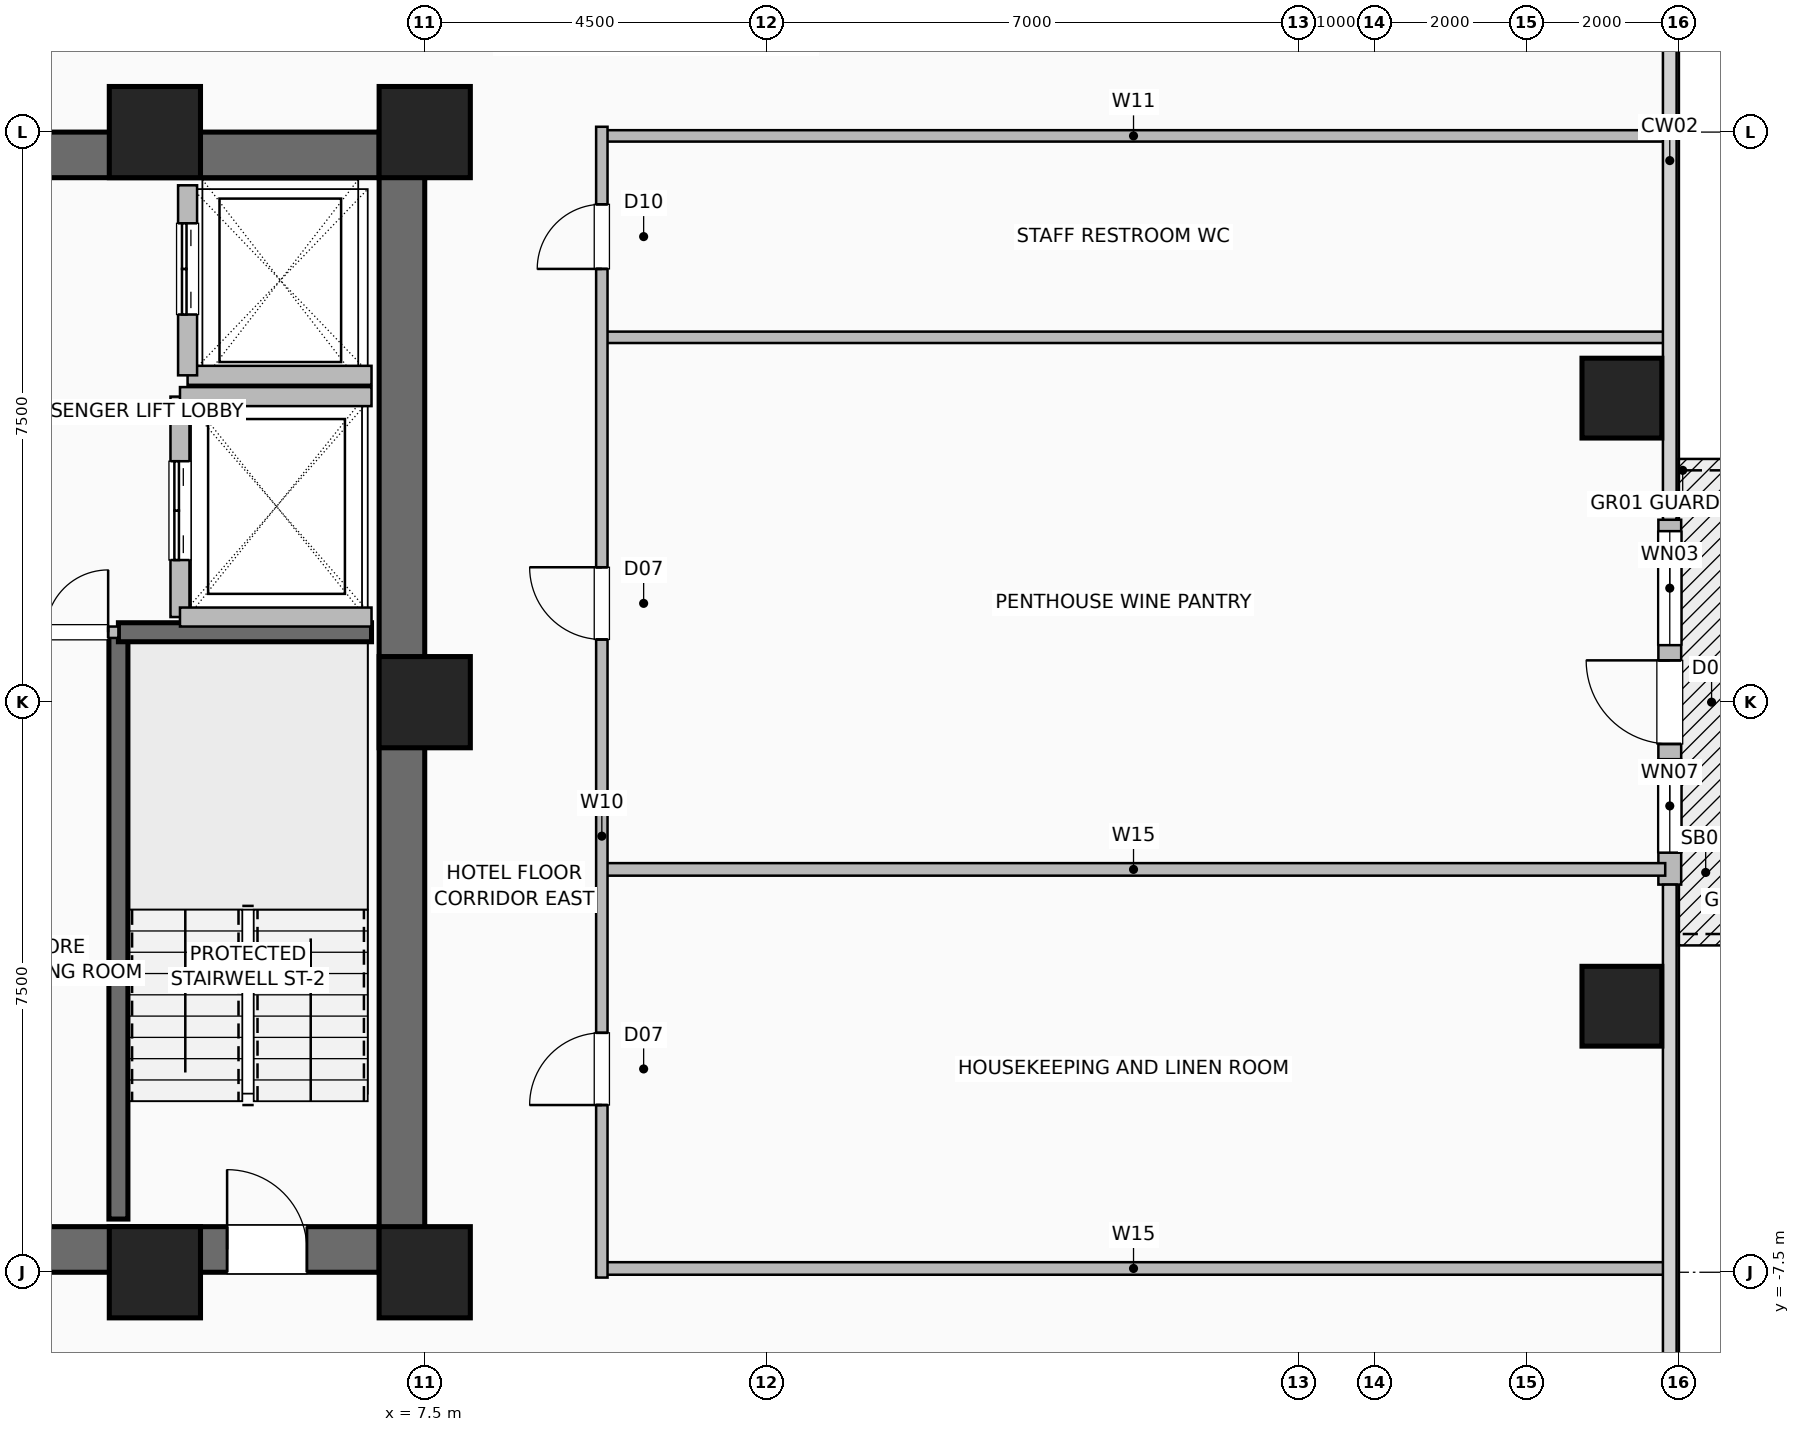
"""IFC4 building model, lengths in metres.
Left out: names, types, materials, properties, quantities, classifications, styles, units other than length and angle.
Written with IfcOpenShell. Run it as: python <this file> out.ifc"""

import sys

from ifc_helpers import new_model, si_unit, direction, frame, frame_2d, origin, origin_2d, place, context, subcontext, project, spatial, rectangle, hollow_rectangle, extrude, element, fill, save


model = new_model("IFC4")
c1 = context("Model", 3, precision=1e-05, world=origin(), true_north=direction((0.0, 1.0)))
c2 = subcontext(c1, "Body", "Model", "MODEL_VIEW")
j1 = project(units=[si_unit("LENGTHUNIT", "METRE"), si_unit("PLANEANGLEUNIT", "RADIAN")], contexts=[c1])
p1 = place(None, origin())
s1 = spatial("IfcSite", under=j1, at=p1, CompositionType="ELEMENT")
p2 = place(p1, origin())
s2 = spatial("IfcBuilding", under=s1, at=p2, CompositionType="ELEMENT")
p3 = place(p2, frame((0.0, 0.0, 76.0)))
s3 = spatial("IfcBuildingStorey", under=s2, at=p3, CompositionType="ELEMENT", Elevation=76.0)
for number, where, z_axis, x_axis in (
    (1, (3.95, -7.5, 0.0), (0.0, 0.0, 1.0), (1.0, 0.0, 0.0)),
    (2, (7.5, -7.5, 0.0), (0.0, 0.0, 1.0), (1.0, 0.0, 0.0)),
    (3, (7.5, 0.0, 0.0), (0.0, 0.0, 1.0), (1.0, 0.0, 0.0)),
    (4, (7.5, 7.5, 0.0), (0.0, 0.0, 1.0), (1.0, 0.0, 0.0)),
    (5, (3.95, 7.5, 0.0), (0.0, 0.0, 1.0), (1.0, 0.0, 0.0)),
):
    element("IfcColumn", number, at=place(p3, frame(where, z_axis=z_axis, x_axis=x_axis)), inside=s3, PredefinedType="COLUMN", context=c2, shape_type="SweptSolid", body=[
        extrude(hollow_rectangle(XDim=1.2, YDim=1.2, WallThickness=0.055, at=origin_2d()), origin(), (0.0, 0.0, 1.0), 3.5),
    ])
for number, where, z_axis, x_axis in (
    (6, (23.25, -4.0, 0.0), (0.0, 0.0, 1.0), (1.0, 0.0, 0.0)),
    (7, (23.25, 4.0, 0.0), (0.0, 0.0, 1.0), (1.0, 0.0, 0.0)),
):
    element("IfcColumn", number, at=place(p3, frame(where, z_axis=z_axis, x_axis=x_axis)), inside=s3, PredefinedType="COLUMN", context=c2, shape_type="SweptSolid", body=[
        extrude(hollow_rectangle(XDim=1.05, YDim=1.05, WallThickness=0.05, at=origin_2d()), origin(), (0.0, 0.0, 1.0), 3.5),
    ])
p4 = place(p3, frame((23.88, -2.4, 0.0), z_axis=(0.0, 0.0, 1.0), x_axis=(0.0, 1.0, 0.0)))
e8 = element("IfcWall", 8, at=p4, inside=s3, PredefinedType="SOLIDWALL", context=c2, shape_type="SweptSolid", body=[
    extrude(rectangle(XDim=4.8, YDim=0.3, at=frame_2d((2.4, 0.0))), origin(), (0.0, 0.0, 1.0), 3.25),
])
p5 = place(p4, frame((1.85, 0.0, 0.0)))
e9 = element("IfcOpeningElement", 9, at=p5, cuts=e8, PredefinedType="OPENING", context=c2, shape_type="SweptSolid", body=[
    extrude(rectangle(XDim=1.1, YDim=2.2, at=frame_2d((0.55, 1.1))), frame((0.0, 0.16, 0.0), z_axis=(0.0, -1.0, 0.0), x_axis=(1.0, 0.0, 0.0)), (0.0, 0.0, 1.0), 0.32),
])
p6 = place(p4, frame((0.42, 0.0, 0.85)))
e10 = element("IfcOpeningElement", 10, at=p6, cuts=e8, PredefinedType="OPENING", context=c2, shape_type="SweptSolid", body=[
    extrude(rectangle(XDim=1.23, YDim=1.8, at=frame_2d((0.615, 0.9))), frame((0.0, 0.16, 0.0), z_axis=(0.0, -1.0, 0.0), x_axis=(1.0, 0.0, 0.0)), (0.0, 0.0, 1.0), 0.32),
])
p7 = place(p4, frame((3.15, 0.0, 0.85)))
e11 = element("IfcOpeningElement", 11, at=p7, cuts=e8, PredefinedType="OPENING", context=c2, shape_type="SweptSolid", body=[
    extrude(rectangle(XDim=1.5, YDim=1.8, at=frame_2d((0.75, 0.9))), frame((0.0, 0.16, 0.0), z_axis=(0.0, -1.0, 0.0), x_axis=(1.0, 0.0, 0.0)), (0.0, 0.0, 1.0), 0.32),
])
p8 = place(p3, frame((-7.5, -7.2, 0.0), z_axis=(0.0, 0.0, 1.0), x_axis=(1.0, 0.0, 0.0)))
e12 = element("IfcWall", 12, at=p8, inside=s3, PredefinedType="SHEAR", context=c2, shape_type="SweptSolid", body=[
    extrude(rectangle(XDim=15.0, YDim=0.6, at=frame_2d((7.5, 0.0))), origin(), (0.0, 0.0, 1.0), 3.25),
])
p9 = place(p8, frame((1.55, 0.0, 0.0)))
e13 = element("IfcOpeningElement", 13, at=p9, cuts=e12, PredefinedType="OPENING", context=c2, shape_type="SweptSolid", body=[
    extrude(rectangle(XDim=1.05, YDim=2.08, at=frame_2d((0.525, 1.04))), frame((0.0, 0.31, 0.0), z_axis=(0.0, -1.0, 0.0), x_axis=(1.0, 0.0, 0.0)), (0.0, 0.0, 1.0), 0.62),
])
p10 = place(p8, frame((12.4, 0.0, 0.0)))
e14 = element("IfcOpeningElement", 14, at=p10, cuts=e12, PredefinedType="OPENING", context=c2, shape_type="SweptSolid", body=[
    extrude(rectangle(XDim=1.05, YDim=2.08, at=frame_2d((0.525, 1.04))), frame((0.0, 0.31, 0.0), z_axis=(0.0, -1.0, 0.0), x_axis=(1.0, 0.0, 0.0)), (0.0, 0.0, 1.0), 0.62),
])
p11 = place(p8, frame((4.64, 0.0, 0.0)))
e15 = element("IfcOpeningElement", 15, at=p11, cuts=e12, PredefinedType="OPENING", context=c2, shape_type="SweptSolid", body=[
    extrude(rectangle(XDim=1.1, YDim=2.2, at=frame_2d((0.55, 1.1))), frame((0.0, 0.31, 0.0), z_axis=(0.0, -1.0, 0.0), x_axis=(1.0, 0.0, 0.0)), (0.0, 0.0, 1.0), 0.62),
])
p12 = place(p8, frame((6.52, 0.0, 0.0)))
e16 = element("IfcOpeningElement", 16, at=p12, cuts=e12, PredefinedType="OPENING", context=c2, shape_type="SweptSolid", body=[
    extrude(rectangle(XDim=1.1, YDim=2.2, at=frame_2d((0.55, 1.1))), frame((0.0, 0.31, 0.0), z_axis=(0.0, -1.0, 0.0), x_axis=(1.0, 0.0, 0.0)), (0.0, 0.0, 1.0), 0.62),
])
p13 = place(p8, frame((8.4, 0.0, 0.0)))
e17 = element("IfcOpeningElement", 17, at=p13, cuts=e12, PredefinedType="OPENING", context=c2, shape_type="SweptSolid", body=[
    extrude(rectangle(XDim=1.1, YDim=2.2, at=frame_2d((0.55, 1.1))), frame((0.0, 0.31, 0.0), z_axis=(0.0, -1.0, 0.0), x_axis=(1.0, 0.0, 0.0)), (0.0, 0.0, 1.0), 0.62),
])
for number, where, z_axis, x_axis in (
    (18, (-7.5, 7.2, 0.0), (0.0, 0.0, 1.0), (1.0, 0.0, 0.0)),
    (19, (7.2, -7.5, 0.0), (0.0, 0.0, 1.0), (0.0, 1.0, 0.0)),
):
    element("IfcWall", number, at=place(p3, frame(where, z_axis=z_axis, x_axis=x_axis)), inside=s3, PredefinedType="SHEAR", context=c2, shape_type="SweptSolid", body=[
        extrude(rectangle(XDim=15.0, YDim=0.6, at=frame_2d((7.5, 0.0))), origin(), (0.0, 0.0, 1.0), 3.25),
    ])
p14 = place(p3, frame((3.47, -6.8, 0.0), z_axis=(0.0, 0.0, 1.0), x_axis=(0.0, 1.0, 0.0)))
e20 = element("IfcWall", 20, at=p14, inside=s3, PredefinedType="SHEAR", context=c2, shape_type="SweptSolid", body=[
    extrude(rectangle(XDim=7.72, YDim=0.25, at=frame_2d((3.86, 0.0))), origin(), (0.0, 0.0, 1.0), 3.25),
])
p15 = place(p3, frame((3.47, 0.92, 0.0), z_axis=(0.0, 0.0, 1.0), x_axis=(1.0, 0.0, 0.0)))
e21 = element("IfcWall", 21, at=p15, inside=s3, PredefinedType="SHEAR", context=c2, shape_type="SweptSolid", body=[
    extrude(rectangle(XDim=3.33, YDim=0.25, at=frame_2d((1.665, 0.0))), origin(), (0.0, 0.0, 1.0), 3.25),
])
p16 = place(p3, frame((4.38, 4.3, 0.0), z_axis=(0.0, 0.0, 1.0), x_axis=(1.0, 0.0, 0.0)))
e22 = element("IfcWall", 22, at=p16, inside=s3, PredefinedType="SHEAR", context=c2, shape_type="SweptSolid", body=[
    extrude(rectangle(XDim=2.42, YDim=0.25, at=frame_2d((1.21, 0.0))), origin(), (0.0, 0.0, 1.0), 3.25),
])
p17 = place(p3, frame((4.38, 4.3, 0.0), z_axis=(0.0, 0.0, 1.0), x_axis=(0.0, 1.0, 0.0)))
e23 = element("IfcWall", 23, at=p17, inside=s3, PredefinedType="SHEAR", context=c2, shape_type="SweptSolid", body=[
    extrude(rectangle(XDim=2.5, YDim=0.25, at=frame_2d((1.25, 0.0))), origin(), (0.0, 0.0, 1.0), 3.25),
])
p18 = place(p17, frame((0.8, 0.0, 0.0)))
e24 = element("IfcOpeningElement", 24, at=p18, cuts=e23, PredefinedType="OPENING", context=c2, shape_type="SweptSolid", body=[
    extrude(rectangle(XDim=1.2, YDim=2.2, at=frame_2d((0.6, 1.1))), frame((0.0, 0.135, 0.0), z_axis=(0.0, -1.0, 0.0), x_axis=(1.0, 0.0, 0.0)), (0.0, 0.0, 1.0), 0.27),
])
p19 = place(p3, frame((4.28, 1.12, 0.0), z_axis=(0.0, 0.0, 1.0), x_axis=(0.0, 1.0, 0.0)))
e25 = element("IfcWall", 25, at=p19, inside=s3, PredefinedType="SHEAR", context=c2, shape_type="SweptSolid", body=[
    extrude(rectangle(XDim=2.9, YDim=0.25, at=frame_2d((1.45, 0.0))), origin(), (0.0, 0.0, 1.0), 3.25),
])
p20 = place(p19, frame((0.75, 0.0, 0.0)))
e26 = element("IfcOpeningElement", 26, at=p20, cuts=e25, PredefinedType="OPENING", context=c2, shape_type="SweptSolid", body=[
    extrude(rectangle(XDim=1.3, YDim=2.3, at=frame_2d((0.65, 1.15))), frame((0.0, 0.135, 0.0), z_axis=(0.0, -1.0, 0.0), x_axis=(1.0, 0.0, 0.0)), (0.0, 0.0, 1.0), 0.27),
])
for number, where, z_axis, x_axis in (
    (27, (4.28, 1.12, 0.0), (0.0, 0.0, 1.0), (1.0, 0.0, 0.0)),
    (28, (4.28, 4.02, 0.0), (0.0, 0.0, 1.0), (1.0, 0.0, 0.0)),
):
    element("IfcWall", number, at=place(p3, frame(where, z_axis=z_axis, x_axis=x_axis)), inside=s3, PredefinedType="SHEAR", context=c2, shape_type="SweptSolid", body=[
        extrude(rectangle(XDim=2.52, YDim=0.25, at=frame_2d((1.26, 0.0))), origin(), (0.0, 0.0, 1.0), 3.25),
    ])
p21 = place(p3, frame((2.38, 0.92, 0.0), z_axis=(0.0, 0.0, 1.0), x_axis=(1.0, 0.0, 0.0)))
e29 = element("IfcWall", 29, at=p21, inside=s3, PredefinedType="PARTITIONING", context=c2, shape_type="SweptSolid", body=[
    extrude(rectangle(XDim=1.09, YDim=0.15, at=frame_2d((0.545, 0.0))), origin(), (0.0, 0.0, 1.0), 3.25),
])
p22 = place(p21, frame((0.135, 0.0, 0.0)))
e30 = element("IfcOpeningElement", 30, at=p22, cuts=e29, PredefinedType="OPENING", context=c2, shape_type="SweptSolid", body=[
    extrude(rectangle(XDim=0.82, YDim=2.05, at=frame_2d((0.41, 1.025))), frame((0.0, 0.085, 0.0), z_axis=(0.0, -1.0, 0.0), x_axis=(1.0, 0.0, 0.0)), (0.0, 0.0, 1.0), 0.17),
])
for number, where, z_axis, x_axis in (
    (31, (9.83, -7.45, 0.0), (0.0, 0.0, 1.0), (1.0, 0.0, 0.0)),
    (32, (9.83, -2.2, 0.0), (0.0, 0.0, 1.0), (1.0, 0.0, 0.0)),
):
    element("IfcWall", number, at=place(p3, frame(where, z_axis=z_axis, x_axis=x_axis)), inside=s3, PredefinedType="PLUMBINGWALL", context=c2, shape_type="SweptSolid", body=[
        extrude(rectangle(XDim=13.99, YDim=0.165, at=frame_2d((6.995, 0.0))), origin(), (0.0, 0.0, 1.0), 3.25),
    ])
for number, where, z_axis, x_axis in (
    (33, (9.83, 4.8, 0.0), (0.0, 0.0, 1.0), (1.0, 0.0, 0.0)),
    (34, (9.83, 7.45, 0.0), (0.0, 0.0, 1.0), (1.0, 0.0, 0.0)),
):
    element("IfcWall", number, at=place(p3, frame(where, z_axis=z_axis, x_axis=x_axis)), inside=s3, PredefinedType="PARTITIONING", context=c2, shape_type="SweptSolid", body=[
        extrude(rectangle(XDim=13.99, YDim=0.15, at=frame_2d((6.995, 0.0))), origin(), (0.0, 0.0, 1.0), 3.25),
    ])
p23 = place(p3, frame((9.83, -7.57, 0.0), z_axis=(0.0, 0.0, 1.0), x_axis=(0.0, 1.0, 0.0)))
e35 = element("IfcWall", 35, at=p23, inside=s3, PredefinedType="PARTITIONING", context=c2, shape_type="SweptSolid", body=[
    extrude(rectangle(XDim=15.14, YDim=0.15, at=frame_2d((7.57, 0.0))), origin(), (0.0, 0.0, 1.0), 3.25),
])
p24 = place(p23, frame((2.27, 0.0, 0.0)))
e36 = element("IfcOpeningElement", 36, at=p24, cuts=e35, PredefinedType="OPENING", context=c2, shape_type="SweptSolid", body=[
    extrude(rectangle(XDim=0.95, YDim=2.06, at=frame_2d((0.475, 1.03))), frame((0.0, 0.085, 0.0), z_axis=(0.0, -1.0, 0.0), x_axis=(1.0, 0.0, 0.0)), (0.0, 0.0, 1.0), 0.17),
])
p25 = place(p23, frame((8.395, 0.0, 0.0)))
e37 = element("IfcOpeningElement", 37, at=p25, cuts=e35, PredefinedType="OPENING", context=c2, shape_type="SweptSolid", body=[
    extrude(rectangle(XDim=0.95, YDim=2.06, at=frame_2d((0.475, 1.03))), frame((0.0, 0.085, 0.0), z_axis=(0.0, -1.0, 0.0), x_axis=(1.0, 0.0, 0.0)), (0.0, 0.0, 1.0), 0.17),
])
p26 = place(p23, frame((13.27, 0.0, 0.0)))
e38 = element("IfcOpeningElement", 38, at=p26, cuts=e35, PredefinedType="OPENING", context=c2, shape_type="SweptSolid", body=[
    extrude(rectangle(XDim=0.85, YDim=2.05, at=frame_2d((0.425, 1.025))), frame((0.0, 0.085, 0.0), z_axis=(0.0, -1.0, 0.0), x_axis=(1.0, 0.0, 0.0)), (0.0, 0.0, 1.0), 0.17),
])
p27 = place(p5, origin())
e39 = element("IfcDoor", 39, at=p27, inside=s3, OperationType="SINGLE_SWING_RIGHT", PredefinedType="DOOR", context=c2, shape_type="SweptSolid", body=[
    extrude(rectangle(XDim=1.1, YDim=2.2, at=frame_2d((0.55, 1.1))), frame((0.0, 0.025, 0.0), z_axis=(0.0, -1.0, 0.0), x_axis=(1.0, 0.0, 0.0)), (0.0, 0.0, 1.0), 0.05),
])
fill(e9, e39)
p28 = place(p6, origin())
e40 = element("IfcWindow", 40, at=p28, inside=s3, PartitioningType="SINGLE_PANEL", PredefinedType="WINDOW", context=c2, shape_type="SweptSolid", body=[
    extrude(rectangle(XDim=1.23, YDim=1.8, at=frame_2d((0.615, 0.9))), frame((0.0, 0.03, 0.0), z_axis=(0.0, -1.0, 0.0), x_axis=(1.0, 0.0, 0.0)), (0.0, 0.0, 1.0), 0.06),
])
fill(e10, e40)
p29 = place(p7, origin())
e41 = element("IfcWindow", 41, at=p29, inside=s3, PartitioningType="SINGLE_PANEL", PredefinedType="WINDOW", context=c2, shape_type="SweptSolid", body=[
    extrude(rectangle(XDim=1.5, YDim=1.8, at=frame_2d((0.75, 0.9))), frame((0.0, 0.03, 0.0), z_axis=(0.0, -1.0, 0.0), x_axis=(1.0, 0.0, 0.0)), (0.0, 0.0, 1.0), 0.06),
])
fill(e11, e41)
p30 = place(p10, origin())
e42 = element("IfcDoor", 42, at=p30, inside=s3, OperationType="SINGLE_SWING_LEFT", PredefinedType="DOOR", context=c2, shape_type="SweptSolid", body=[
    extrude(rectangle(XDim=1.05, YDim=2.08, at=frame_2d((0.525, 1.04))), frame((0.0, 0.025, 0.0), z_axis=(0.0, -1.0, 0.0), x_axis=(1.0, 0.0, 0.0)), (0.0, 0.0, 1.0), 0.05),
])
fill(e14, e42)
p31 = place(p18, origin())
e43 = element("IfcDoor", 43, at=p31, inside=s3, OperationType="DOUBLE_DOOR_SLIDING", PredefinedType="DOOR", context=c2, shape_type="SweptSolid", body=[
    extrude(rectangle(XDim=1.2, YDim=2.2, at=frame_2d((0.6, 1.1))), frame((0.0, 0.025, 0.0), z_axis=(0.0, -1.0, 0.0), x_axis=(1.0, 0.0, 0.0)), (0.0, 0.0, 1.0), 0.05),
])
fill(e24, e43)
p32 = place(p20, origin())
e44 = element("IfcDoor", 44, at=p32, inside=s3, OperationType="DOUBLE_DOOR_SLIDING", PredefinedType="DOOR", context=c2, shape_type="SweptSolid", body=[
    extrude(rectangle(XDim=1.3, YDim=2.3, at=frame_2d((0.65, 1.15))), frame((0.0, 0.025, 0.0), z_axis=(0.0, -1.0, 0.0), x_axis=(1.0, 0.0, 0.0)), (0.0, 0.0, 1.0), 0.05),
])
fill(e26, e44)
p33 = place(p22, origin())
e45 = element("IfcDoor", 45, at=p33, inside=s3, OperationType="SINGLE_SWING_RIGHT", PredefinedType="DOOR", context=c2, shape_type="SweptSolid", body=[
    extrude(rectangle(XDim=0.82, YDim=2.05, at=frame_2d((0.41, 1.025))), frame((0.0, 0.025, 0.0), z_axis=(0.0, -1.0, 0.0), x_axis=(1.0, 0.0, 0.0)), (0.0, 0.0, 1.0), 0.05),
])
fill(e30, e45)
p34 = place(p24, origin())
e46 = element("IfcDoor", 46, at=p34, inside=s3, OperationType="SINGLE_SWING_LEFT", PredefinedType="DOOR", context=c2, shape_type="SweptSolid", body=[
    extrude(rectangle(XDim=0.95, YDim=2.06, at=frame_2d((0.475, 1.03))), frame((0.0, 0.025, 0.0), z_axis=(0.0, -1.0, 0.0), x_axis=(1.0, 0.0, 0.0)), (0.0, 0.0, 1.0), 0.05),
])
fill(e36, e46)
p35 = place(p25, origin())
e47 = element("IfcDoor", 47, at=p35, inside=s3, OperationType="SINGLE_SWING_RIGHT", PredefinedType="DOOR", context=c2, shape_type="SweptSolid", body=[
    extrude(rectangle(XDim=0.95, YDim=2.06, at=frame_2d((0.475, 1.03))), frame((0.0, 0.025, 0.0), z_axis=(0.0, -1.0, 0.0), x_axis=(1.0, 0.0, 0.0)), (0.0, 0.0, 1.0), 0.05),
])
fill(e37, e47)
p36 = place(p26, origin())
e48 = element("IfcDoor", 48, at=p36, inside=s3, OperationType="SINGLE_SWING_LEFT", PredefinedType="DOOR", context=c2, shape_type="SweptSolid", body=[
    extrude(rectangle(XDim=0.85, YDim=2.05, at=frame_2d((0.425, 1.025))), frame((0.0, 0.025, 0.0), z_axis=(0.0, -1.0, 0.0), x_axis=(1.0, 0.0, 0.0)), (0.0, 0.0, 1.0), 0.05),
])
fill(e38, e48)
save(model, sys.argv[1])
